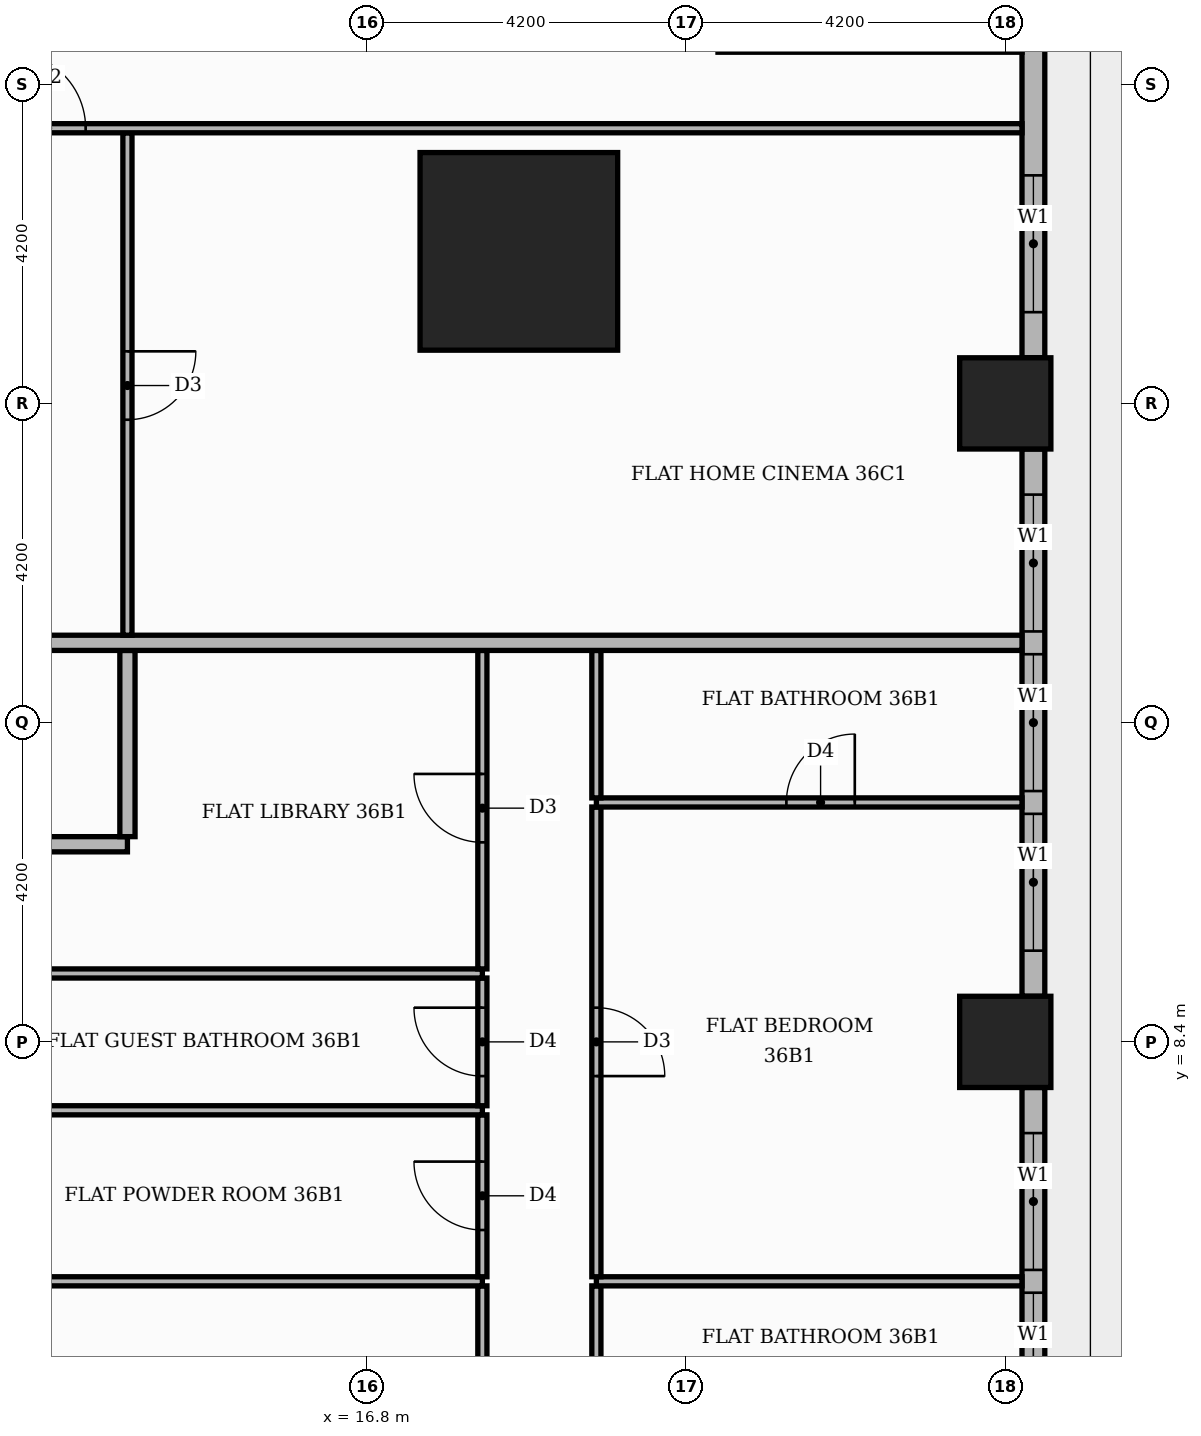
"""IFC4 building model, lengths in metres.
Left out: names, types, materials, properties, quantities, classifications, styles, units other than length and angle.
Written with IfcOpenShell. Run it as: python <this file> out.ifc"""

import sys

from ifc_helpers import new_model, si_unit, direction, frame, frame_2d, origin, origin_2d, place, context, subcontext, project, spatial, rectangle, extrude, element, fill, save


model = new_model("IFC4")
c1 = context("Model", 3, precision=1e-05, world=origin(), true_north=direction((0.0, 1.0)))
c2 = subcontext(c1, "Body", "Model", "MODEL_VIEW")
j1 = project(units=[si_unit("LENGTHUNIT", "METRE"), si_unit("PLANEANGLEUNIT", "RADIAN")], contexts=[c1])
p1 = place(None, origin())
s1 = spatial("IfcSite", under=j1, at=p1, CompositionType="ELEMENT")
p2 = place(p1, origin())
s2 = spatial("IfcBuilding", under=s1, at=p2, CompositionType="ELEMENT")
p3 = place(p2, frame((0.0, 0.0, 153.3)))
s3 = spatial("IfcBuildingStorey", under=s2, at=p3, CompositionType="ELEMENT", Elevation=153.3)
p4 = place(p3, frame((18.8, 18.8, 0.0), z_axis=(0.0, 0.0, 1.0), x_axis=(1.0, 0.0, 0.0)))
e1 = element("IfcColumn", 1, at=p4, inside=s3, PredefinedType="COLUMN", context=c2, shape_type="SweptSolid", body=[
    extrude(rectangle(XDim=2.6, YDim=2.6, at=origin_2d()), origin(), (0.0, 0.0, 1.0), 3.9),
])
for number, where, z_axis, x_axis in (
    (2, (25.2, 8.4, 0.0), (0.0, 0.0, 1.0), (1.0, 0.0, 0.0)),
    (3, (25.2, 16.8, 0.0), (0.0, 0.0, 1.0), (1.0, 0.0, 0.0)),
):
    element("IfcColumn", number, at=place(p3, frame(where, z_axis=z_axis, x_axis=x_axis)), inside=s3, PredefinedType="COLUMN", context=c2, shape_type="SweptSolid", body=[
        extrude(rectangle(XDim=1.2, YDim=1.2, at=origin_2d()), origin(), (0.0, 0.0, 1.0), 3.9),
    ])
p5 = place(p3, frame((25.57, 0.6, 0.0), z_axis=(0.0, 0.0, 1.0), x_axis=(0.0, 1.0, 0.0)))
e4 = element("IfcWall", 4, at=p5, inside=s3, PredefinedType="STANDARD", context=c2, shape_type="SweptSolid", body=[
    extrude(rectangle(XDim=7.2, YDim=0.3, at=frame_2d((3.6, 0.0))), origin(), (0.0, 0.0, 1.0), 3.48),
])
p6 = place(p5, frame((0.6, 0.0, 0.9)))
e5 = element("IfcOpeningElement", 5, at=p6, cuts=e4, PredefinedType="OPENING", context=c2, shape_type="SweptSolid", body=[
    extrude(rectangle(XDim=1.8, YDim=2.1, at=frame_2d((0.9, 1.05))), frame((0.0, 0.16, 0.0), z_axis=(0.0, -1.0, 0.0), x_axis=(1.0, 0.0, 0.0)), (0.0, 0.0, 1.0), 0.32),
])
p7 = place(p5, frame((2.7, 0.0, 0.9)))
e6 = element("IfcOpeningElement", 6, at=p7, cuts=e4, PredefinedType="OPENING", context=c2, shape_type="SweptSolid", body=[
    extrude(rectangle(XDim=1.8, YDim=2.1, at=frame_2d((0.9, 1.05))), frame((0.0, 0.16, 0.0), z_axis=(0.0, -1.0, 0.0), x_axis=(1.0, 0.0, 0.0)), (0.0, 0.0, 1.0), 0.32),
])
p8 = place(p5, frame((4.8, 0.0, 0.9)))
e7 = element("IfcOpeningElement", 7, at=p8, cuts=e4, PredefinedType="OPENING", context=c2, shape_type="SweptSolid", body=[
    extrude(rectangle(XDim=1.8, YDim=2.1, at=frame_2d((0.9, 1.05))), frame((0.0, 0.16, 0.0), z_axis=(0.0, -1.0, 0.0), x_axis=(1.0, 0.0, 0.0)), (0.0, 0.0, 1.0), 0.32),
])
p9 = place(p3, frame((25.57, 9.0, 0.0), z_axis=(0.0, 0.0, 1.0), x_axis=(0.0, 1.0, 0.0)))
e8 = element("IfcWall", 8, at=p9, inside=s3, PredefinedType="STANDARD", context=c2, shape_type="SweptSolid", body=[
    extrude(rectangle(XDim=7.2, YDim=0.3, at=frame_2d((3.6, 0.0))), origin(), (0.0, 0.0, 1.0), 3.48),
])
p10 = place(p9, frame((0.6, 0.0, 0.9)))
e9 = element("IfcOpeningElement", 9, at=p10, cuts=e8, PredefinedType="OPENING", context=c2, shape_type="SweptSolid", body=[
    extrude(rectangle(XDim=1.8, YDim=2.1, at=frame_2d((0.9, 1.05))), frame((0.0, 0.16, 0.0), z_axis=(0.0, -1.0, 0.0), x_axis=(1.0, 0.0, 0.0)), (0.0, 0.0, 1.0), 0.32),
])
p11 = place(p9, frame((2.7, 0.0, 0.9)))
e10 = element("IfcOpeningElement", 10, at=p11, cuts=e8, PredefinedType="OPENING", context=c2, shape_type="SweptSolid", body=[
    extrude(rectangle(XDim=1.8, YDim=2.1, at=frame_2d((0.9, 1.05))), frame((0.0, 0.16, 0.0), z_axis=(0.0, -1.0, 0.0), x_axis=(1.0, 0.0, 0.0)), (0.0, 0.0, 1.0), 0.32),
])
p12 = place(p9, frame((4.8, 0.0, 0.9)))
e11 = element("IfcOpeningElement", 11, at=p12, cuts=e8, PredefinedType="OPENING", context=c2, shape_type="SweptSolid", body=[
    extrude(rectangle(XDim=1.8, YDim=2.1, at=frame_2d((0.9, 1.05))), frame((0.0, 0.16, 0.0), z_axis=(0.0, -1.0, 0.0), x_axis=(1.0, 0.0, 0.0)), (0.0, 0.0, 1.0), 0.32),
])
p13 = place(p3, frame((25.57, 17.4, 0.0), z_axis=(0.0, 0.0, 1.0), x_axis=(0.0, 1.0, 0.0)))
e12 = element("IfcWall", 12, at=p13, inside=s3, PredefinedType="STANDARD", context=c2, shape_type="SweptSolid", body=[
    extrude(rectangle(XDim=4.32, YDim=0.3, at=frame_2d((2.16, 0.0))), origin(), (0.0, 0.0, 1.0), 3.48),
])
p14 = place(p13, frame((0.6, 0.0, 0.9)))
e13 = element("IfcOpeningElement", 13, at=p14, cuts=e12, PredefinedType="OPENING", context=c2, shape_type="SweptSolid", body=[
    extrude(rectangle(XDim=1.8, YDim=2.1, at=frame_2d((0.9, 1.05))), frame((0.0, 0.16, 0.0), z_axis=(0.0, -1.0, 0.0), x_axis=(1.0, 0.0, 0.0)), (0.0, 0.0, 1.0), 0.32),
])
p15 = place(p3, frame((18.32, 1.11, 0.0), z_axis=(0.0, 0.0, 1.0), x_axis=(0.0, 1.0, 0.0)))
e14 = element("IfcWall", 14, at=p15, inside=s3, PredefinedType="PARTITIONING", context=c2, shape_type="SweptSolid", body=[
    extrude(rectangle(XDim=4.08, YDim=0.12, at=frame_2d((2.04, 0.0))), origin(), (0.0, 0.0, 1.0), 3.48),
])
p16 = place(p15, frame((1.59, 0.0, 0.0)))
e15 = element("IfcOpeningElement", 15, at=p16, cuts=e14, PredefinedType="OPENING", context=c2, shape_type="SweptSolid", body=[
    extrude(rectangle(XDim=0.9, YDim=2.1, at=frame_2d((0.45, 1.05))), frame((0.0, 0.07, 0.0), z_axis=(0.0, -1.0, 0.0), x_axis=(1.0, 0.0, 0.0)), (0.0, 0.0, 1.0), 0.14),
])
p17 = place(p3, frame((19.82, 3.21, 0.0), z_axis=(0.0, 0.0, 1.0), x_axis=(0.0, 1.0, 0.0)))
e16 = element("IfcWall", 16, at=p17, inside=s3, PredefinedType="PARTITIONING", context=c2, shape_type="SweptSolid", body=[
    extrude(rectangle(XDim=1.98, YDim=0.12, at=frame_2d((0.99, 0.0))), origin(), (0.0, 0.0, 1.0), 3.48),
])
p18 = place(p3, frame((11.0, 5.25, 0.0), z_axis=(0.0, 0.0, 1.0), x_axis=(1.0, 0.0, 0.0)))
e17 = element("IfcWall", 17, at=p18, inside=s3, PredefinedType="PARTITIONING", context=c2, shape_type="SweptSolid", body=[
    extrude(rectangle(XDim=7.32, YDim=0.12, at=frame_2d((3.66, 0.0))), origin(), (0.0, 0.0, 1.0), 3.48),
])
p19 = place(p3, frame((19.82, 5.25, 0.0), z_axis=(0.0, 0.0, 1.0), x_axis=(1.0, 0.0, 0.0)))
e18 = element("IfcWall", 18, at=p19, inside=s3, PredefinedType="PARTITIONING", context=c2, shape_type="SweptSolid", body=[
    extrude(rectangle(XDim=5.6, YDim=0.12, at=frame_2d((2.8, 0.0))), origin(), (0.0, 0.0, 1.0), 3.48),
])
p20 = place(p3, frame((18.32, 5.31, 0.0), z_axis=(0.0, 0.0, 1.0), x_axis=(0.0, 1.0, 0.0)))
e19 = element("IfcWall", 19, at=p20, inside=s3, PredefinedType="PARTITIONING", context=c2, shape_type="SweptSolid", body=[
    extrude(rectangle(XDim=2.13, YDim=0.12, at=frame_2d((1.065, 0.0))), origin(), (0.0, 0.0, 1.0), 3.48),
])
p21 = place(p20, frame((0.615, 0.0, 0.0)))
e20 = element("IfcOpeningElement", 20, at=p21, cuts=e19, PredefinedType="OPENING", context=c2, shape_type="SweptSolid", body=[
    extrude(rectangle(XDim=0.9, YDim=2.1, at=frame_2d((0.45, 1.05))), frame((0.0, 0.07, 0.0), z_axis=(0.0, -1.0, 0.0), x_axis=(1.0, 0.0, 0.0)), (0.0, 0.0, 1.0), 0.14),
])
p22 = place(p3, frame((19.82, 5.31, 0.0), z_axis=(0.0, 0.0, 1.0), x_axis=(0.0, 1.0, 0.0)))
e21 = element("IfcWall", 21, at=p22, inside=s3, PredefinedType="PARTITIONING", context=c2, shape_type="SweptSolid", body=[
    extrude(rectangle(XDim=6.18, YDim=0.12, at=frame_2d((3.09, 0.0))), origin(), (0.0, 0.0, 1.0), 3.48),
])
p23 = place(p22, frame((2.64, 0.0, 0.0)))
e22 = element("IfcOpeningElement", 22, at=p23, cuts=e21, PredefinedType="OPENING", context=c2, shape_type="SweptSolid", body=[
    extrude(rectangle(XDim=0.9, YDim=2.1, at=frame_2d((0.45, 1.05))), frame((0.0, 0.07, 0.0), z_axis=(0.0, -1.0, 0.0), x_axis=(1.0, 0.0, 0.0)), (0.0, 0.0, 1.0), 0.14),
])
p24 = place(p3, frame((11.0, 7.5, 0.0), z_axis=(0.0, 0.0, 1.0), x_axis=(1.0, 0.0, 0.0)))
e23 = element("IfcWall", 23, at=p24, inside=s3, PredefinedType="PARTITIONING", context=c2, shape_type="SweptSolid", body=[
    extrude(rectangle(XDim=7.32, YDim=0.12, at=frame_2d((3.66, 0.0))), origin(), (0.0, 0.0, 1.0), 3.48),
])
p25 = place(p3, frame((18.32, 7.56, 0.0), z_axis=(0.0, 0.0, 1.0), x_axis=(0.0, 1.0, 0.0)))
e24 = element("IfcWall", 24, at=p25, inside=s3, PredefinedType="PARTITIONING", context=c2, shape_type="SweptSolid", body=[
    extrude(rectangle(XDim=1.68, YDim=0.12, at=frame_2d((0.84, 0.0))), origin(), (0.0, 0.0, 1.0), 3.48),
])
p26 = place(p25, frame((0.39, 0.0, 0.0)))
e25 = element("IfcOpeningElement", 25, at=p26, cuts=e24, PredefinedType="OPENING", context=c2, shape_type="SweptSolid", body=[
    extrude(rectangle(XDim=0.9, YDim=2.1, at=frame_2d((0.45, 1.05))), frame((0.0, 0.07, 0.0), z_axis=(0.0, -1.0, 0.0), x_axis=(1.0, 0.0, 0.0)), (0.0, 0.0, 1.0), 0.14),
])
p27 = place(p3, frame((11.0, 9.3, 0.0), z_axis=(0.0, 0.0, 1.0), x_axis=(1.0, 0.0, 0.0)))
e26 = element("IfcWall", 26, at=p27, inside=s3, PredefinedType="PARTITIONING", context=c2, shape_type="SweptSolid", body=[
    extrude(rectangle(XDim=7.32, YDim=0.12, at=frame_2d((3.66, 0.0))), origin(), (0.0, 0.0, 1.0), 3.48),
])
p28 = place(p3, frame((18.32, 9.36, 0.0), z_axis=(0.0, 0.0, 1.0), x_axis=(0.0, 1.0, 0.0)))
e27 = element("IfcWall", 27, at=p28, inside=s3, PredefinedType="PARTITIONING", context=c2, shape_type="SweptSolid", body=[
    extrude(rectangle(XDim=4.19, YDim=0.12, at=frame_2d((2.095, 0.0))), origin(), (0.0, 0.0, 1.0), 3.48),
])
p29 = place(p28, frame((1.665, 0.0, 0.0)))
e28 = element("IfcOpeningElement", 28, at=p29, cuts=e27, PredefinedType="OPENING", context=c2, shape_type="SweptSolid", body=[
    extrude(rectangle(XDim=0.9, YDim=2.1, at=frame_2d((0.45, 1.05))), frame((0.0, 0.07, 0.0), z_axis=(0.0, -1.0, 0.0), x_axis=(1.0, 0.0, 0.0)), (0.0, 0.0, 1.0), 0.14),
])
p30 = place(p3, frame((11.0, 11.0, 0.0), z_axis=(0.0, 0.0, 1.0), x_axis=(1.0, 0.0, 0.0)))
e29 = element("IfcWall", 29, at=p30, inside=s3, PredefinedType="PARTITIONING", context=c2, shape_type="SweptSolid", body=[
    extrude(rectangle(XDim=2.65, YDim=0.2, at=frame_2d((1.325, 0.0))), origin(), (0.0, 0.0, 1.0), 3.48),
])
p31 = place(p3, frame((13.65, 11.1, 0.0), z_axis=(0.0, 0.0, 1.0), x_axis=(0.0, 1.0, 0.0)))
e30 = element("IfcWall", 30, at=p31, inside=s3, PredefinedType="PARTITIONING", context=c2, shape_type="SweptSolid", body=[
    extrude(rectangle(XDim=2.45, YDim=0.2, at=frame_2d((1.225, 0.0))), origin(), (0.0, 0.0, 1.0), 3.48),
])
p32 = place(p3, frame((19.82, 11.55, 0.0), z_axis=(0.0, 0.0, 1.0), x_axis=(1.0, 0.0, 0.0)))
e31 = element("IfcWall", 31, at=p32, inside=s3, PredefinedType="PARTITIONING", context=c2, shape_type="SweptSolid", body=[
    extrude(rectangle(XDim=5.6, YDim=0.12, at=frame_2d((2.8, 0.0))), origin(), (0.0, 0.0, 1.0), 3.48),
])
p33 = place(p32, frame((2.5, 0.0, 0.0)))
e32 = element("IfcOpeningElement", 32, at=p33, cuts=e31, PredefinedType="OPENING", context=c2, shape_type="SweptSolid", body=[
    extrude(rectangle(XDim=0.9, YDim=2.1, at=frame_2d((0.45, 1.05))), frame((0.0, 0.07, 0.0), z_axis=(0.0, -1.0, 0.0), x_axis=(1.0, 0.0, 0.0)), (0.0, 0.0, 1.0), 0.14),
])
p34 = place(p3, frame((19.82, 11.61, 0.0), z_axis=(0.0, 0.0, 1.0), x_axis=(0.0, 1.0, 0.0)))
e33 = element("IfcWall", 33, at=p34, inside=s3, PredefinedType="PARTITIONING", context=c2, shape_type="SweptSolid", body=[
    extrude(rectangle(XDim=1.94, YDim=0.12, at=frame_2d((0.97, 0.0))), origin(), (0.0, 0.0, 1.0), 3.48),
])
p35 = place(p3, frame((-13.65, 13.65, 0.0), z_axis=(0.0, 0.0, 1.0), x_axis=(1.0, 0.0, 0.0)))
e34 = element("IfcWall", 34, at=p35, inside=s3, PredefinedType="PARTITIONING", context=c2, shape_type="SweptSolid", body=[
    extrude(rectangle(XDim=39.07, YDim=0.2, at=frame_2d((19.535, 0.0))), origin(), (0.0, 0.0, 1.0), 3.48),
])
p36 = place(p35, frame((23.6, 0.0, 0.0)))
e35 = element("IfcOpeningElement", 35, at=p36, cuts=e34, PredefinedType="OPENING", context=c2, shape_type="SweptSolid", body=[
    extrude(rectangle(XDim=1.1, YDim=2.4, at=frame_2d((0.55, 1.2))), frame((0.0, 0.11, 0.0), z_axis=(0.0, -1.0, 0.0), x_axis=(1.0, 0.0, 0.0)), (0.0, 0.0, 1.0), 0.22),
])
p37 = place(p3, frame((13.65, 13.75, 0.0), z_axis=(0.0, 0.0, 1.0), x_axis=(0.0, 1.0, 0.0)))
e36 = element("IfcWall", 36, at=p37, inside=s3, PredefinedType="PARTITIONING", context=c2, shape_type="SweptSolid", body=[
    extrude(rectangle(XDim=6.61, YDim=0.12, at=frame_2d((3.305, 0.0))), origin(), (0.0, 0.0, 1.0), 3.48),
])
p38 = place(p37, frame((2.835, 0.0, 0.0)))
e37 = element("IfcOpeningElement", 37, at=p38, cuts=e36, PredefinedType="OPENING", context=c2, shape_type="SweptSolid", body=[
    extrude(rectangle(XDim=0.9, YDim=2.1, at=frame_2d((0.45, 1.05))), frame((0.0, 0.07, 0.0), z_axis=(0.0, -1.0, 0.0), x_axis=(1.0, 0.0, 0.0)), (0.0, 0.0, 1.0), 0.14),
])
p39 = place(p3, frame((7.35, 20.42, 0.0), z_axis=(0.0, 0.0, 1.0), x_axis=(1.0, 0.0, 0.0)))
e38 = element("IfcWall", 38, at=p39, inside=s3, PredefinedType="PARTITIONING", context=c2, shape_type="SweptSolid", body=[
    extrude(rectangle(XDim=18.07, YDim=0.12, at=frame_2d((9.035, 0.0))), origin(), (0.0, 0.0, 1.0), 3.48),
])
p40 = place(p39, frame((4.75, 0.0, 0.0)))
e39 = element("IfcOpeningElement", 39, at=p40, cuts=e38, PredefinedType="OPENING", context=c2, shape_type="SweptSolid", body=[
    extrude(rectangle(XDim=1.0, YDim=2.1, at=frame_2d((0.5, 1.05))), frame((0.0, 0.07, 0.0), z_axis=(0.0, -1.0, 0.0), x_axis=(1.0, 0.0, 0.0)), (0.0, 0.0, 1.0), 0.14),
])
p41 = place(p39, frame((1.6, 0.0, 0.0)))
e40 = element("IfcOpeningElement", 40, at=p41, cuts=e38, PredefinedType="OPENING", context=c2, shape_type="SweptSolid", body=[
    extrude(rectangle(XDim=1.0, YDim=2.1, at=frame_2d((0.5, 1.05))), frame((0.0, 0.07, 0.0), z_axis=(0.0, -1.0, 0.0), x_axis=(1.0, 0.0, 0.0)), (0.0, 0.0, 1.0), 0.14),
])
p42 = place(p7, origin())
e41 = element("IfcWindow", 41, at=p42, inside=s3, PartitioningType="SINGLE_PANEL", PredefinedType="WINDOW", context=c2, shape_type="SweptSolid", body=[
    extrude(rectangle(XDim=1.8, YDim=2.1, at=frame_2d((0.9, 1.05))), frame((0.0, 0.03, 0.0), z_axis=(0.0, -1.0, 0.0), x_axis=(1.0, 0.0, 0.0)), (0.0, 0.0, 1.0), 0.06),
])
fill(e6, e41)
p43 = place(p8, origin())
e42 = element("IfcWindow", 42, at=p43, inside=s3, PartitioningType="SINGLE_PANEL", PredefinedType="WINDOW", context=c2, shape_type="SweptSolid", body=[
    extrude(rectangle(XDim=1.8, YDim=2.1, at=frame_2d((0.9, 1.05))), frame((0.0, 0.03, 0.0), z_axis=(0.0, -1.0, 0.0), x_axis=(1.0, 0.0, 0.0)), (0.0, 0.0, 1.0), 0.06),
])
fill(e7, e42)
p44 = place(p10, origin())
e43 = element("IfcWindow", 43, at=p44, inside=s3, PartitioningType="SINGLE_PANEL", PredefinedType="WINDOW", context=c2, shape_type="SweptSolid", body=[
    extrude(rectangle(XDim=1.8, YDim=2.1, at=frame_2d((0.9, 1.05))), frame((0.0, 0.03, 0.0), z_axis=(0.0, -1.0, 0.0), x_axis=(1.0, 0.0, 0.0)), (0.0, 0.0, 1.0), 0.06),
])
fill(e9, e43)
p45 = place(p11, origin())
e44 = element("IfcWindow", 44, at=p45, inside=s3, PartitioningType="SINGLE_PANEL", PredefinedType="WINDOW", context=c2, shape_type="SweptSolid", body=[
    extrude(rectangle(XDim=1.8, YDim=2.1, at=frame_2d((0.9, 1.05))), frame((0.0, 0.03, 0.0), z_axis=(0.0, -1.0, 0.0), x_axis=(1.0, 0.0, 0.0)), (0.0, 0.0, 1.0), 0.06),
])
fill(e10, e44)
p46 = place(p12, origin())
e45 = element("IfcWindow", 45, at=p46, inside=s3, PartitioningType="SINGLE_PANEL", PredefinedType="WINDOW", context=c2, shape_type="SweptSolid", body=[
    extrude(rectangle(XDim=1.8, YDim=2.1, at=frame_2d((0.9, 1.05))), frame((0.0, 0.03, 0.0), z_axis=(0.0, -1.0, 0.0), x_axis=(1.0, 0.0, 0.0)), (0.0, 0.0, 1.0), 0.06),
])
fill(e11, e45)
p47 = place(p14, origin())
e46 = element("IfcWindow", 46, at=p47, inside=s3, PartitioningType="SINGLE_PANEL", PredefinedType="WINDOW", context=c2, shape_type="SweptSolid", body=[
    extrude(rectangle(XDim=1.8, YDim=2.1, at=frame_2d((0.9, 1.05))), frame((0.0, 0.03, 0.0), z_axis=(0.0, -1.0, 0.0), x_axis=(1.0, 0.0, 0.0)), (0.0, 0.0, 1.0), 0.06),
])
fill(e13, e46)
p48 = place(p21, origin())
e47 = element("IfcDoor", 47, at=p48, inside=s3, OperationType="SINGLE_SWING_RIGHT", PredefinedType="DOOR", context=c2, shape_type="SweptSolid", body=[
    extrude(rectangle(XDim=0.9, YDim=2.1, at=frame_2d((0.45, 1.05))), frame((0.0, 0.025, 0.0), z_axis=(0.0, -1.0, 0.0), x_axis=(1.0, 0.0, 0.0)), (0.0, 0.0, 1.0), 0.05),
])
fill(e20, e47)
p49 = place(p26, origin())
e48 = element("IfcDoor", 48, at=p49, inside=s3, OperationType="SINGLE_SWING_RIGHT", PredefinedType="DOOR", context=c2, shape_type="SweptSolid", body=[
    extrude(rectangle(XDim=0.9, YDim=2.1, at=frame_2d((0.45, 1.05))), frame((0.0, 0.025, 0.0), z_axis=(0.0, -1.0, 0.0), x_axis=(1.0, 0.0, 0.0)), (0.0, 0.0, 1.0), 0.05),
])
fill(e25, e48)
p50 = place(p29, origin())
e49 = element("IfcDoor", 49, at=p50, inside=s3, OperationType="SINGLE_SWING_RIGHT", PredefinedType="DOOR", context=c2, shape_type="SweptSolid", body=[
    extrude(rectangle(XDim=0.9, YDim=2.1, at=frame_2d((0.45, 1.05))), frame((0.0, 0.025, 0.0), z_axis=(0.0, -1.0, 0.0), x_axis=(1.0, 0.0, 0.0)), (0.0, 0.0, 1.0), 0.05),
])
fill(e28, e49)
p51 = place(p23, frame((0.9, 0.0, 0.0), z_axis=(0.0, 0.0, 1.0), x_axis=(-1.0, 0.0, 0.0)))
e50 = element("IfcDoor", 50, at=p51, inside=s3, OperationType="SINGLE_SWING_LEFT", PredefinedType="DOOR", context=c2, shape_type="SweptSolid", body=[
    extrude(rectangle(XDim=0.9, YDim=2.1, at=frame_2d((0.45, 1.05))), frame((0.0, 0.025, 0.0), z_axis=(0.0, -1.0, 0.0), x_axis=(1.0, 0.0, 0.0)), (0.0, 0.0, 1.0), 0.05),
])
fill(e22, e50)
p52 = place(p33, origin())
e51 = element("IfcDoor", 51, at=p52, inside=s3, OperationType="SINGLE_SWING_RIGHT", PredefinedType="DOOR", context=c2, shape_type="SweptSolid", body=[
    extrude(rectangle(XDim=0.9, YDim=2.1, at=frame_2d((0.45, 1.05))), frame((0.0, 0.025, 0.0), z_axis=(0.0, -1.0, 0.0), x_axis=(1.0, 0.0, 0.0)), (0.0, 0.0, 1.0), 0.05),
])
fill(e32, e51)
p53 = place(p38, frame((0.9, 0.0, 0.0), z_axis=(0.0, 0.0, 1.0), x_axis=(-1.0, 0.0, 0.0)))
e52 = element("IfcDoor", 52, at=p53, inside=s3, OperationType="SINGLE_SWING_RIGHT", PredefinedType="DOOR", context=c2, shape_type="SweptSolid", body=[
    extrude(rectangle(XDim=0.9, YDim=2.1, at=frame_2d((0.45, 1.05))), frame((0.0, 0.025, 0.0), z_axis=(0.0, -1.0, 0.0), x_axis=(1.0, 0.0, 0.0)), (0.0, 0.0, 1.0), 0.05),
])
fill(e37, e52)
p54 = place(p40, origin())
e53 = element("IfcDoor", 53, at=p54, inside=s3, OperationType="SINGLE_SWING_LEFT", PredefinedType="DOOR", context=c2, shape_type="SweptSolid", body=[
    extrude(rectangle(XDim=1.0, YDim=2.1, at=frame_2d((0.5, 1.05))), frame((0.0, 0.025, 0.0), z_axis=(0.0, -1.0, 0.0), x_axis=(1.0, 0.0, 0.0)), (0.0, 0.0, 1.0), 0.05),
])
fill(e39, e53)
save(model, sys.argv[1])
